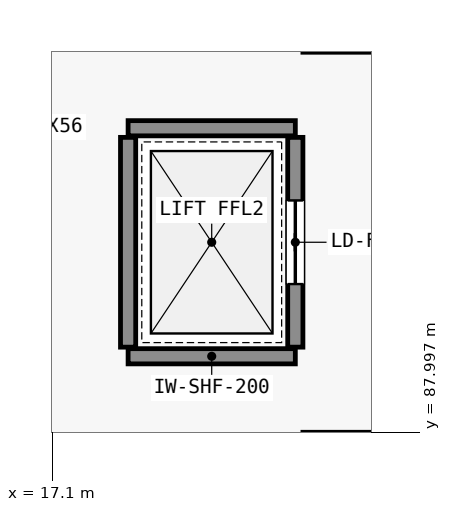
"""IFC4 building model, lengths in metres.
Left out: names, types, materials, properties, quantities, classifications, styles, units other than length and angle.
Written with IfcOpenShell. Run it as: python <this file> out.ifc"""

import sys

from ifc_helpers import new_model, si_unit, direction, frame, frame_2d, origin, place, context, subcontext, project, spatial, rectangle, extrude, element, fill, save


model = new_model("IFC4")
c1 = context("Model", 3, precision=1e-05, world=origin(), true_north=direction((0.0, 1.0)))
c2 = subcontext(c1, "Body", "Model", "MODEL_VIEW")
j1 = project(units=[si_unit("LENGTHUNIT", "METRE"), si_unit("PLANEANGLEUNIT", "RADIAN")], contexts=[c1])
p1 = place(None, origin())
s1 = spatial("IfcSite", under=j1, at=p1, CompositionType="ELEMENT")
p2 = place(p1, origin())
s2 = spatial("IfcBuilding", under=s1, at=p2, CompositionType="ELEMENT")
p3 = place(p2, origin())
s3 = spatial("IfcBuildingStorey", under=s2, at=p3, CompositionType="ELEMENT", Elevation=0.0)
for number, where, z_axis, x_axis in (
    (1, (18.1, 89.0, 0.0), (0.0, 0.0, 1.0), (1.0, 0.0, 0.0)),
    (2, (18.1, 92.0, 0.0), (0.0, 0.0, 1.0), (1.0, 0.0, 0.0)),
):
    element("IfcWall", number, at=place(p3, frame(where, z_axis=z_axis, x_axis=x_axis)), inside=s3, PredefinedType="STANDARD", context=c2, shape_type="SweptSolid", body=[
        extrude(rectangle(XDim=2.2, YDim=0.2, at=frame_2d((1.1, 0.0))), origin(), (0.0, 0.0, 1.0), 5.64),
    ])
p4 = place(p3, frame((18.1, 89.12, 0.0), z_axis=(0.0, 0.0, 1.0), x_axis=(0.0, 1.0, 0.0)))
e3 = element("IfcWall", 3, at=p4, inside=s3, PredefinedType="STANDARD", context=c2, shape_type="SweptSolid", body=[
    extrude(rectangle(XDim=2.76, YDim=0.2, at=frame_2d((1.38, 0.0))), origin(), (0.0, 0.0, 1.0), 5.64),
])
p5 = place(p3, frame((20.3, 89.12, 0.0), z_axis=(0.0, 0.0, 1.0), x_axis=(0.0, 1.0, 0.0)))
e4 = element("IfcWall", 4, at=p5, inside=s3, PredefinedType="STANDARD", context=c2, shape_type="SweptSolid", body=[
    extrude(rectangle(XDim=2.76, YDim=0.2, at=frame_2d((1.38, 0.0))), origin(), (0.0, 0.0, 1.0), 5.64),
])
p6 = place(p5, frame((0.83, 0.0, 0.0)))
e5 = element("IfcOpeningElement", 5, at=p6, cuts=e4, PredefinedType="OPENING", context=c2, shape_type="SweptSolid", body=[
    extrude(rectangle(XDim=1.1, YDim=2.15, at=frame_2d((0.55, 1.075))), frame((0.0, 0.11, 0.0), z_axis=(0.0, -1.0, 0.0), x_axis=(1.0, 0.0, 0.0)), (0.0, 0.0, 1.0), 0.22),
])
p7 = place(p6, origin())
e6 = element("IfcDoor", 6, at=p7, inside=s3, OperationType="SLIDING_TO_LEFT", PredefinedType="DOOR", context=c2, shape_type="SweptSolid", body=[
    extrude(rectangle(XDim=1.1, YDim=2.15, at=frame_2d((0.55, 1.075))), frame((0.0, 0.025, 0.0), z_axis=(0.0, -1.0, 0.0), x_axis=(1.0, 0.0, 0.0)), (0.0, 0.0, 1.0), 0.05),
])
fill(e5, e6)
save(model, sys.argv[1])
